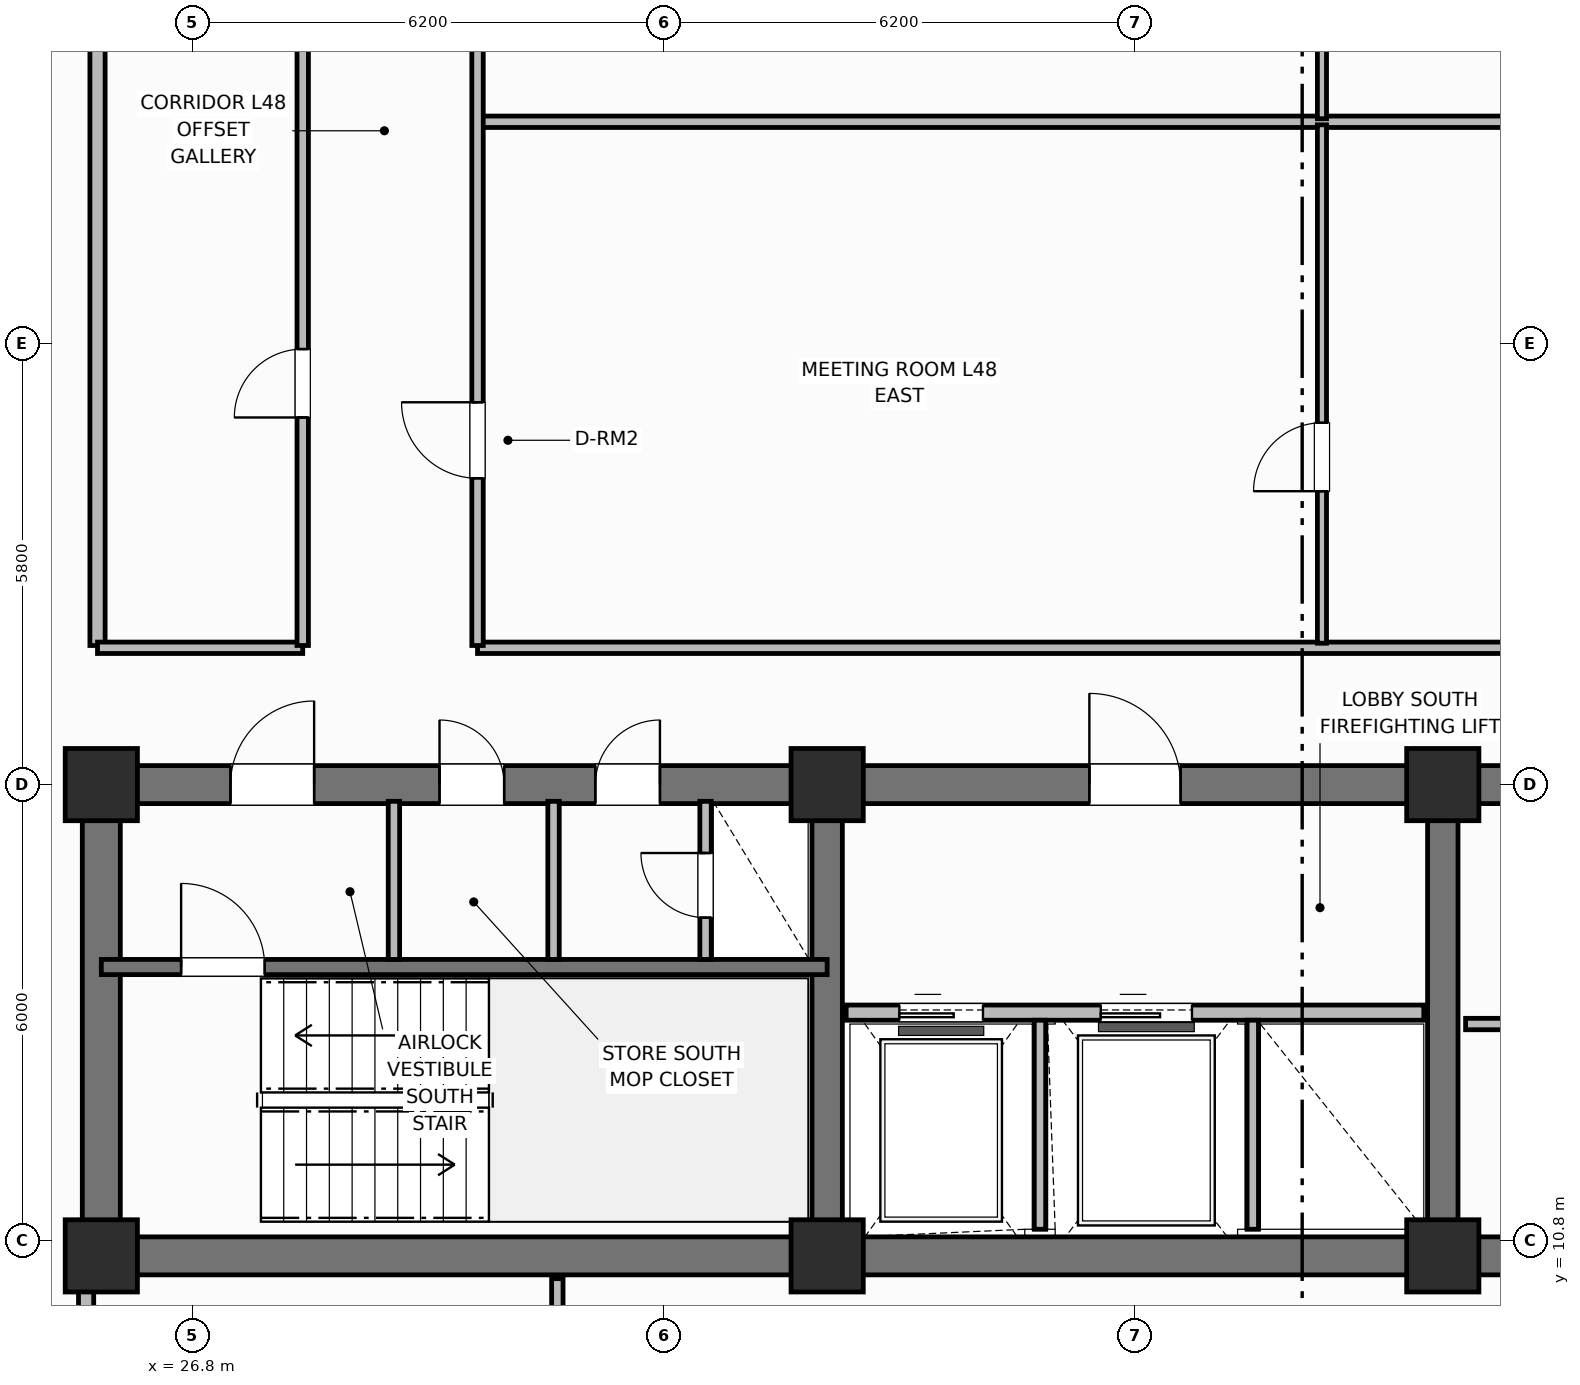
"""IFC4 building model, lengths in metres.
Left out: names, types, materials, properties, quantities, classifications, styles, units other than length and angle.
Written with IfcOpenShell. Run it as: python <this file> out.ifc"""

import sys

from ifc_helpers import new_model, si_unit, direction, frame, frame_2d, origin, origin_2d, place, context, subcontext, project, spatial, rectangle, extrude, element, fill, save


model = new_model("IFC4")
c1 = context("Model", 3, precision=1e-05, world=origin(), true_north=direction((0.0, 1.0)))
c2 = subcontext(c1, "Body", "Model", "MODEL_VIEW")
j1 = project(units=[si_unit("LENGTHUNIT", "METRE"), si_unit("PLANEANGLEUNIT", "RADIAN")], contexts=[c1])
p1 = place(None, origin())
s1 = spatial("IfcSite", under=j1, at=p1, CompositionType="ELEMENT")
p2 = place(p1, origin())
s2 = spatial("IfcBuilding", under=s1, at=p2, CompositionType="ELEMENT")
p3 = place(p2, frame((0.0, 0.0, 192.2)))
s3 = spatial("IfcBuildingStorey", under=s2, at=p3, CompositionType="ELEMENT", Elevation=192.2)
p4 = place(p3, frame((52.8, 10.6, 0.0), z_axis=(0.0, 0.0, 1.0), x_axis=(-1.0, 0.0, 0.0)))
e1 = element("IfcWall", 1, at=p4, inside=s3, PredefinedType="SHEAR", context=c2, shape_type="SweptSolid", body=[
    extrude(rectangle(XDim=27.2, YDim=0.5, at=frame_2d((13.6, 0.0))), origin(), (0.0, 0.0, 1.0), 3.7),
])
p5 = place(p3, frame((25.6, 10.85, 0.0), z_axis=(0.0, 0.0, 1.0), x_axis=(0.0, 1.0, 0.0)))
e2 = element("IfcWall", 2, at=p5, inside=s3, PredefinedType="SHEAR", context=c2, shape_type="SweptSolid", body=[
    extrude(rectangle(XDim=5.7, YDim=0.5, at=frame_2d((2.85, 0.0))), origin(), (0.0, 0.0, 1.0), 3.7),
])
p6 = place(p3, frame((25.6, 16.8, 0.0), z_axis=(0.0, 0.0, 1.0), x_axis=(1.0, 0.0, 0.0)))
e3 = element("IfcWall", 3, at=p6, inside=s3, PredefinedType="SHEAR", context=c2, shape_type="SweptSolid", body=[
    extrude(rectangle(XDim=27.2, YDim=0.5, at=frame_2d((13.6, 0.0))), origin(), (0.0, 0.0, 1.0), 3.7),
])
p7 = place(p6, frame((1.7, 0.0, 0.0)))
e4 = element("IfcOpeningElement", 4, at=p7, cuts=e3, PredefinedType="OPENING", context=c2, shape_type="SweptSolid", body=[
    extrude(rectangle(XDim=1.1, YDim=2.15, at=frame_2d((0.55, 1.075))), frame((0.0, 0.26, 0.0), z_axis=(0.0, -1.0, 0.0), x_axis=(1.0, 0.0, 0.0)), (0.0, 0.0, 1.0), 0.52),
])
p8 = place(p6, frame((4.45, 0.0, 0.0)))
e5 = element("IfcOpeningElement", 5, at=p8, cuts=e3, PredefinedType="OPENING", context=c2, shape_type="SweptSolid", body=[
    extrude(rectangle(XDim=0.85, YDim=2.1, at=frame_2d((0.425, 1.05))), frame((0.0, 0.26, 0.0), z_axis=(0.0, -1.0, 0.0), x_axis=(1.0, 0.0, 0.0)), (0.0, 0.0, 1.0), 0.52),
])
p9 = place(p6, frame((6.5, 0.0, 0.0)))
e6 = element("IfcOpeningElement", 6, at=p9, cuts=e3, PredefinedType="OPENING", context=c2, shape_type="SweptSolid", body=[
    extrude(rectangle(XDim=0.85, YDim=2.1, at=frame_2d((0.425, 1.05))), frame((0.0, 0.26, 0.0), z_axis=(0.0, -1.0, 0.0), x_axis=(1.0, 0.0, 0.0)), (0.0, 0.0, 1.0), 0.52),
])
p10 = place(p6, frame((13.0, 0.0, 0.0)))
e7 = element("IfcOpeningElement", 7, at=p10, cuts=e3, PredefinedType="OPENING", context=c2, shape_type="SweptSolid", body=[
    extrude(rectangle(XDim=1.2, YDim=2.15, at=frame_2d((0.6, 1.075))), frame((0.0, 0.26, 0.0), z_axis=(0.0, -1.0, 0.0), x_axis=(1.0, 0.0, 0.0)), (0.0, 0.0, 1.0), 0.52),
])
p11 = place(p6, frame((19.8, 0.0, 0.0)))
e8 = element("IfcOpeningElement", 8, at=p11, cuts=e3, PredefinedType="OPENING", context=c2, shape_type="SweptSolid", body=[
    extrude(rectangle(XDim=0.85, YDim=2.1, at=frame_2d((0.425, 1.05))), frame((0.0, 0.26, 0.0), z_axis=(0.0, -1.0, 0.0), x_axis=(1.0, 0.0, 0.0)), (0.0, 0.0, 1.0), 0.52),
])
p12 = place(p6, frame((24.2, 0.0, 0.0)))
e9 = element("IfcOpeningElement", 9, at=p12, cuts=e3, PredefinedType="OPENING", context=c2, shape_type="SweptSolid", body=[
    extrude(rectangle(XDim=0.85, YDim=2.1, at=frame_2d((0.425, 1.05))), frame((0.0, 0.26, 0.0), z_axis=(0.0, -1.0, 0.0), x_axis=(1.0, 0.0, 0.0)), (0.0, 0.0, 1.0), 0.52),
])
for number, where, z_axis, x_axis in (
    (10, (35.15, 10.85, 0.0), (0.0, 0.0, 1.0), (0.0, 1.0, 0.0)),
    (11, (43.25, 10.85, 0.0), (0.0, 0.0, 1.0), (0.0, 1.0, 0.0)),
):
    element("IfcWall", number, at=place(p3, frame(where, z_axis=z_axis, x_axis=x_axis)), inside=s3, PredefinedType="SHEAR", context=c2, shape_type="SweptSolid", body=[
        extrude(rectangle(XDim=5.7, YDim=0.4, at=frame_2d((2.85, 0.0))), origin(), (0.0, 0.0, 1.0), 3.7),
    ])
for number, where, z_axis, x_axis in (
    (12, (25.6, 10.6, 0.0), (0.0, 0.0, 1.0), (1.0, 0.0, 0.0)),
    (13, (25.6, 16.8, 0.0), (0.0, 0.0, 1.0), (1.0, 0.0, 0.0)),
    (14, (35.15, 10.6, 0.0), (0.0, 0.0, 1.0), (1.0, 0.0, 0.0)),
    (15, (35.15, 16.8, 0.0), (0.0, 0.0, 1.0), (1.0, 0.0, 0.0)),
    (16, (43.25, 10.6, 0.0), (0.0, 0.0, 1.0), (1.0, 0.0, 0.0)),
    (17, (43.25, 16.8, 0.0), (0.0, 0.0, 1.0), (1.0, 0.0, 0.0)),
):
    element("IfcColumn", number, at=place(p3, frame(where, z_axis=z_axis, x_axis=x_axis)), inside=s3, PredefinedType="COLUMN", context=c2, shape_type="SweptSolid", body=[
        extrude(rectangle(XDim=0.95, YDim=0.95, at=origin_2d()), origin(), (0.0, 0.0, 1.0), 3.7),
    ])
p13 = place(p3, frame((25.6, 14.4, 0.0), z_axis=(0.0, 0.0, 1.0), x_axis=(1.0, 0.0, 0.0)))
e18 = element("IfcWall", 18, at=p13, inside=s3, PredefinedType="SHEAR", context=c2, shape_type="SweptSolid", body=[
    extrude(rectangle(XDim=9.55, YDim=0.2, at=frame_2d((4.775, 0.0))), origin(), (0.0, 0.0, 1.0), 3.7),
])
p14 = place(p13, frame((1.05, 0.0, 0.0)))
e19 = element("IfcOpeningElement", 19, at=p14, cuts=e18, PredefinedType="OPENING", context=c2, shape_type="SweptSolid", body=[
    extrude(rectangle(XDim=1.1, YDim=2.15, at=frame_2d((0.55, 1.075))), frame((0.0, 0.11, 0.0), z_axis=(0.0, -1.0, 0.0), x_axis=(1.0, 0.0, 0.0)), (0.0, 0.0, 1.0), 0.22),
])
for number, where, z_axis, x_axis in (
    (20, (29.45, 14.5, 0.0), (0.0, 0.0, 1.0), (0.0, 1.0, 0.0)),
    (21, (31.55, 14.5, 0.0), (0.0, 0.0, 1.0), (0.0, 1.0, 0.0)),
):
    element("IfcWall", number, at=place(p3, frame(where, z_axis=z_axis, x_axis=x_axis)), inside=s3, PredefinedType="PARTITIONING", context=c2, shape_type="SweptSolid", body=[
        extrude(rectangle(XDim=2.08, YDim=0.15, at=frame_2d((1.04, 0.0))), origin(), (0.0, 0.0, 1.0), 2.49),
    ])
p15 = place(p3, frame((33.55, 14.5, 0.0), z_axis=(0.0, 0.0, 1.0), x_axis=(0.0, 1.0, 0.0)))
e22 = element("IfcWall", 22, at=p15, inside=s3, PredefinedType="PARTITIONING", context=c2, shape_type="SweptSolid", body=[
    extrude(rectangle(XDim=2.08, YDim=0.15, at=frame_2d((1.04, 0.0))), origin(), (0.0, 0.0, 1.0), 2.49),
])
p16 = place(p15, frame((0.55, 0.0, 0.0)))
e23 = element("IfcOpeningElement", 23, at=p16, cuts=e22, PredefinedType="OPENING", context=c2, shape_type="SweptSolid", body=[
    extrude(rectangle(XDim=0.85, YDim=2.05, at=frame_2d((0.425, 1.025))), frame((0.0, 0.085, 0.0), z_axis=(0.0, -1.0, 0.0), x_axis=(1.0, 0.0, 0.0)), (0.0, 0.0, 1.0), 0.17),
])
p17 = place(p3, frame((35.4, 13.8, 0.0), z_axis=(0.0, 0.0, 1.0), x_axis=(1.0, 0.0, 0.0)))
e24 = element("IfcWall", 24, at=p17, inside=s3, PredefinedType="PARTITIONING", context=c2, shape_type="SweptSolid", body=[
    extrude(rectangle(XDim=7.6, YDim=0.2, at=frame_2d((3.8, 0.0))), origin(), (0.0, 0.0, 1.0), 2.26),
])
p18 = place(p17, frame((0.7, 0.0, 0.0)))
e25 = element("IfcOpeningElement", 25, at=p18, cuts=e24, PredefinedType="OPENING", context=c2, shape_type="SweptSolid", body=[
    extrude(rectangle(XDim=1.1, YDim=2.15, at=frame_2d((0.55, 1.075))), frame((0.0, 0.11, 0.0), z_axis=(0.0, -1.0, 0.0), x_axis=(1.0, 0.0, 0.0)), (0.0, 0.0, 1.0), 0.22),
])
p19 = place(p17, frame((3.35, 0.0, 0.0)))
e26 = element("IfcOpeningElement", 26, at=p19, cuts=e24, PredefinedType="OPENING", context=c2, shape_type="SweptSolid", body=[
    extrude(rectangle(XDim=1.2, YDim=2.15, at=frame_2d((0.6, 1.075))), frame((0.0, 0.11, 0.0), z_axis=(0.0, -1.0, 0.0), x_axis=(1.0, 0.0, 0.0)), (0.0, 0.0, 1.0), 0.22),
])
for number, where, z_axis, x_axis in (
    (27, (37.95, 10.95, 0.0), (0.0, 0.0, 1.0), (0.0, 1.0, 0.0)),
    (28, (40.75, 10.95, 0.0), (0.0, 0.0, 1.0), (0.0, 1.0, 0.0)),
):
    element("IfcWall", number, at=place(p3, frame(where, z_axis=z_axis, x_axis=x_axis)), inside=s3, PredefinedType="PARTITIONING", context=c2, shape_type="SweptSolid", body=[
        extrude(rectangle(XDim=2.75, YDim=0.15, at=frame_2d((1.375, 0.0))), origin(), (0.0, 0.0, 1.0), 2.49),
    ])
p20 = place(p3, frame((43.55, 13.65, 0.0), z_axis=(0.0, 0.0, 1.0), x_axis=(1.0, 0.0, 0.0)))
e29 = element("IfcWall", 29, at=p20, inside=s3, PredefinedType="PARTITIONING", context=c2, shape_type="SweptSolid", body=[
    extrude(rectangle(XDim=4.4, YDim=0.15, at=frame_2d((2.2, 0.0))), origin(), (0.0, 0.0, 1.0), 2.49),
])
p21 = place(p20, frame((1.6, 0.0, 0.0)))
e30 = element("IfcOpeningElement", 30, at=p21, cuts=e29, PredefinedType="OPENING", context=c2, shape_type="SweptSolid", body=[
    extrude(rectangle(XDim=0.85, YDim=2.1, at=frame_2d((0.425, 1.05))), frame((0.0, 0.085, 0.0), z_axis=(0.0, -1.0, 0.0), x_axis=(1.0, 0.0, 0.0)), (0.0, 0.0, 1.0), 0.17),
])
p22 = place(p3, frame((25.55, 18.63, 0.0), z_axis=(0.0, 0.0, 1.0), x_axis=(0.0, 1.0, 0.0)))
e31 = element("IfcWall", 31, at=p22, inside=s3, PredefinedType="PARTITIONING", context=c2, shape_type="SweptSolid", body=[
    extrude(rectangle(XDim=19.14, YDim=0.2, at=frame_2d((9.57, 0.0))), origin(), (0.0, 0.0, 1.0), 2.49),
])
p23 = place(p3, frame((25.55, 18.6, 0.0), z_axis=(0.0, 0.0, 1.0), x_axis=(1.0, 0.0, 0.0)))
e32 = element("IfcWall", 32, at=p23, inside=s3, PredefinedType="PARTITIONING", context=c2, shape_type="SweptSolid", body=[
    extrude(rectangle(XDim=2.7, YDim=0.15, at=frame_2d((1.35, 0.0))), origin(), (0.0, 0.0, 1.0), 2.49),
])
p24 = place(p3, frame((30.55, 18.6, 0.0), z_axis=(0.0, 0.0, 1.0), x_axis=(1.0, 0.0, 0.0)))
e33 = element("IfcWall", 33, at=p24, inside=s3, PredefinedType="PARTITIONING", context=c2, shape_type="SweptSolid", body=[
    extrude(rectangle(XDim=22.3, YDim=0.15, at=frame_2d((11.15, 0.0))), origin(), (0.0, 0.0, 1.0), 2.49),
])
p25 = place(p3, frame((30.58, 25.521, 0.0), z_axis=(0.0, 0.0, 1.0), x_axis=(1.0, 0.0, 0.0)))
e34 = element("IfcWall", 34, at=p25, inside=s3, PredefinedType="PARTITIONING", context=c2, shape_type="SweptSolid", body=[
    extrude(rectangle(XDim=22.22, YDim=0.15, at=frame_2d((11.11, 0.0))), origin(), (0.0, 0.0, 1.0), 2.49),
])
p26 = place(p3, frame((41.66, 18.66, 0.0), z_axis=(0.0, 0.0, 1.0), x_axis=(0.0, 1.0, 0.0)))
e35 = element("IfcWall", 35, at=p26, inside=s3, PredefinedType="PARTITIONING", context=c2, shape_type="SweptSolid", body=[
    extrude(rectangle(XDim=6.821, YDim=0.12, at=frame_2d((3.41, 0.0))), origin(), (0.0, 0.0, 1.0), 2.49),
])
p27 = place(p26, frame((2.0, 0.0, 0.0)))
e36 = element("IfcOpeningElement", 36, at=p27, cuts=e35, PredefinedType="OPENING", context=c2, shape_type="SweptSolid", body=[
    extrude(rectangle(XDim=0.9, YDim=2.1, at=frame_2d((0.45, 1.05))), frame((0.0, 0.07, 0.0), z_axis=(0.0, -1.0, 0.0), x_axis=(1.0, 0.0, 0.0)), (0.0, 0.0, 1.0), 0.14),
])
p28 = place(p3, frame((41.66, 25.56, 0.0), z_axis=(0.0, 0.0, 1.0), x_axis=(0.0, 1.0, 0.0)))
e37 = element("IfcWall", 37, at=p28, inside=s3, PredefinedType="PARTITIONING", context=c2, shape_type="SweptSolid", body=[
    extrude(rectangle(XDim=12.18, YDim=0.12, at=frame_2d((6.09, 0.0))), origin(), (0.0, 0.0, 1.0), 2.49),
])
p29 = place(p28, frame((2.0, 0.0, 0.0)))
e38 = element("IfcOpeningElement", 38, at=p29, cuts=e37, PredefinedType="OPENING", context=c2, shape_type="SweptSolid", body=[
    extrude(rectangle(XDim=0.9, YDim=2.1, at=frame_2d((0.45, 1.05))), frame((0.0, 0.07, 0.0), z_axis=(0.0, -1.0, 0.0), x_axis=(1.0, 0.0, 0.0)), (0.0, 0.0, 1.0), 0.14),
])
p30 = place(p3, frame((28.25, 18.63, 0.0), z_axis=(0.0, 0.0, 1.0), x_axis=(0.0, 1.0, 0.0)))
e39 = element("IfcWall", 39, at=p30, inside=s3, PredefinedType="PARTITIONING", context=c2, shape_type="SweptSolid", body=[
    extrude(rectangle(XDim=19.14, YDim=0.15, at=frame_2d((9.57, 0.0))), origin(), (0.0, 0.0, 1.0), 2.49),
])
p31 = place(p30, frame((3.0, 0.0, 0.0)))
e40 = element("IfcOpeningElement", 40, at=p31, cuts=e39, PredefinedType="OPENING", context=c2, shape_type="SweptSolid", body=[
    extrude(rectangle(XDim=0.9, YDim=2.1, at=frame_2d((0.45, 1.05))), frame((0.0, 0.085, 0.0), z_axis=(0.0, -1.0, 0.0), x_axis=(1.0, 0.0, 0.0)), (0.0, 0.0, 1.0), 0.17),
])
p32 = place(p30, frame((11.5, 0.0, 0.0)))
e41 = element("IfcOpeningElement", 41, at=p32, cuts=e39, PredefinedType="OPENING", context=c2, shape_type="SweptSolid", body=[
    extrude(rectangle(XDim=0.9, YDim=2.1, at=frame_2d((0.45, 1.05))), frame((0.0, 0.085, 0.0), z_axis=(0.0, -1.0, 0.0), x_axis=(1.0, 0.0, 0.0)), (0.0, 0.0, 1.0), 0.17),
])
p33 = place(p3, frame((30.55, 18.63, 0.0), z_axis=(0.0, 0.0, 1.0), x_axis=(0.0, 1.0, 0.0)))
e42 = element("IfcWall", 42, at=p33, inside=s3, PredefinedType="PARTITIONING", context=c2, shape_type="SweptSolid", body=[
    extrude(rectangle(XDim=19.14, YDim=0.15, at=frame_2d((9.57, 0.0))), origin(), (0.0, 0.0, 1.0), 2.49),
])
p34 = place(p33, frame((2.2, 0.0, 0.0)))
e43 = element("IfcOpeningElement", 43, at=p34, cuts=e42, PredefinedType="OPENING", context=c2, shape_type="SweptSolid", body=[
    extrude(rectangle(XDim=1.0, YDim=2.15, at=frame_2d((0.5, 1.075))), frame((0.0, 0.085, 0.0), z_axis=(0.0, -1.0, 0.0), x_axis=(1.0, 0.0, 0.0)), (0.0, 0.0, 1.0), 0.17),
])
p35 = place(p33, frame((8.89, 0.0, 0.0)))
e44 = element("IfcOpeningElement", 44, at=p35, cuts=e42, PredefinedType="OPENING", context=c2, shape_type="SweptSolid", body=[
    extrude(rectangle(XDim=1.0, YDim=2.15, at=frame_2d((0.5, 1.075))), frame((0.0, 0.085, 0.0), z_axis=(0.0, -1.0, 0.0), x_axis=(1.0, 0.0, 0.0)), (0.0, 0.0, 1.0), 0.17),
])
p36 = place(p3, frame((31.6, 6.87, 0.0), z_axis=(0.0, 0.0, 1.0), x_axis=(0.0, 1.0, 0.0)))
e45 = element("IfcWall", 45, at=p36, inside=s3, PredefinedType="PARTITIONING", context=c2, shape_type="SweptSolid", body=[
    extrude(rectangle(XDim=3.43, YDim=0.15, at=frame_2d((1.715, 0.0))), origin(), (0.0, 0.0, 1.0), 2.49),
])
p37 = place(p36, frame((1.75, 0.0, 0.0)))
e46 = element("IfcOpeningElement", 46, at=p37, cuts=e45, PredefinedType="OPENING", context=c2, shape_type="SweptSolid", body=[
    extrude(rectangle(XDim=0.9, YDim=2.1, at=frame_2d((0.45, 1.05))), frame((0.0, 0.085, 0.0), z_axis=(0.0, -1.0, 0.0), x_axis=(1.0, 0.0, 0.0)), (0.0, 0.0, 1.0), 0.17),
])
p38 = place(p3, frame((25.4, 7.97, 0.0), z_axis=(0.0, 0.0, 1.0), x_axis=(0.0, 1.0, 0.0)))
e47 = element("IfcWall", 47, at=p38, inside=s3, PredefinedType="PARTITIONING", context=c2, shape_type="SweptSolid", body=[
    extrude(rectangle(XDim=2.33, YDim=0.2, at=frame_2d((1.165, 0.0))), origin(), (0.0, 0.0, 1.0), 2.49),
])
p39 = place(p38, frame((0.65, 0.0, 0.0)))
e48 = element("IfcOpeningElement", 48, at=p39, cuts=e47, PredefinedType="OPENING", context=c2, shape_type="SweptSolid", body=[
    extrude(rectangle(XDim=0.9, YDim=2.1, at=frame_2d((0.45, 1.05))), frame((0.0, 0.11, 0.0), z_axis=(0.0, -1.0, 0.0), x_axis=(1.0, 0.0, 0.0)), (0.0, 0.0, 1.0), 0.22),
])
p40 = place(p14, origin())
e49 = element("IfcDoor", 49, at=p40, inside=s3, OperationType="SINGLE_SWING_LEFT", PredefinedType="DOOR", context=c2, shape_type="SweptSolid", body=[
    extrude(rectangle(XDim=1.1, YDim=2.15, at=frame_2d((0.55, 1.075))), frame((0.0, 0.025, 0.0), z_axis=(0.0, -1.0, 0.0), x_axis=(1.0, 0.0, 0.0)), (0.0, 0.0, 1.0), 0.05),
])
fill(e19, e49)
p41 = place(p16, origin())
e50 = element("IfcDoor", 50, at=p41, inside=s3, OperationType="SINGLE_SWING_RIGHT", PredefinedType="TRAPDOOR", context=c2, shape_type="SweptSolid", body=[
    extrude(rectangle(XDim=0.85, YDim=2.05, at=frame_2d((0.425, 1.025))), frame((0.0, 0.025, 0.0), z_axis=(0.0, -1.0, 0.0), x_axis=(1.0, 0.0, 0.0)), (0.0, 0.0, 1.0), 0.05),
])
fill(e23, e50)
p42 = place(p18, origin())
e51 = element("IfcDoor", 51, at=p42, inside=s3, OperationType="SLIDING_TO_LEFT", PredefinedType="DOOR", context=c2, shape_type="SweptSolid", body=[
    extrude(rectangle(XDim=1.1, YDim=2.15, at=frame_2d((0.55, 1.075))), frame((0.0, 0.025, 0.0), z_axis=(0.0, -1.0, 0.0), x_axis=(1.0, 0.0, 0.0)), (0.0, 0.0, 1.0), 0.05),
])
fill(e25, e51)
p43 = place(p19, origin())
e52 = element("IfcDoor", 52, at=p43, inside=s3, OperationType="SLIDING_TO_LEFT", PredefinedType="DOOR", context=c2, shape_type="SweptSolid", body=[
    extrude(rectangle(XDim=1.2, YDim=2.15, at=frame_2d((0.6, 1.075))), frame((0.0, 0.025, 0.0), z_axis=(0.0, -1.0, 0.0), x_axis=(1.0, 0.0, 0.0)), (0.0, 0.0, 1.0), 0.05),
])
fill(e26, e52)
p44 = place(p27, origin())
e53 = element("IfcDoor", 53, at=p44, inside=s3, OperationType="SINGLE_SWING_LEFT", PredefinedType="DOOR", context=c2, shape_type="SweptSolid", body=[
    extrude(rectangle(XDim=0.9, YDim=2.1, at=frame_2d((0.45, 1.05))), frame((0.0, 0.025, 0.0), z_axis=(0.0, -1.0, 0.0), x_axis=(1.0, 0.0, 0.0)), (0.0, 0.0, 1.0), 0.05),
])
fill(e36, e53)
p45 = place(p31, origin())
e54 = element("IfcDoor", 54, at=p45, inside=s3, OperationType="SINGLE_SWING_LEFT", PredefinedType="DOOR", context=c2, shape_type="SweptSolid", body=[
    extrude(rectangle(XDim=0.9, YDim=2.1, at=frame_2d((0.45, 1.05))), frame((0.0, 0.025, 0.0), z_axis=(0.0, -1.0, 0.0), x_axis=(1.0, 0.0, 0.0)), (0.0, 0.0, 1.0), 0.05),
])
fill(e40, e54)
p46 = place(p34, origin())
e55 = element("IfcDoor", 55, at=p46, inside=s3, OperationType="SINGLE_SWING_RIGHT", PredefinedType="DOOR", context=c2, shape_type="SweptSolid", body=[
    extrude(rectangle(XDim=1.0, YDim=2.15, at=frame_2d((0.5, 1.075))), frame((0.0, 0.025, 0.0), z_axis=(0.0, -1.0, 0.0), x_axis=(1.0, 0.0, 0.0)), (0.0, 0.0, 1.0), 0.05),
])
fill(e43, e55)
p47 = place(p7, origin())
e56 = element("IfcDoor", 56, at=p47, inside=s3, OperationType="SINGLE_SWING_RIGHT", PredefinedType="DOOR", context=c2, shape_type="SweptSolid", body=[
    extrude(rectangle(XDim=1.1, YDim=2.15, at=frame_2d((0.55, 1.075))), frame((0.0, 0.025, 0.0), z_axis=(0.0, -1.0, 0.0), x_axis=(1.0, 0.0, 0.0)), (0.0, 0.0, 1.0), 0.05),
])
fill(e4, e56)
p48 = place(p8, origin())
e57 = element("IfcDoor", 57, at=p48, inside=s3, OperationType="SINGLE_SWING_LEFT", PredefinedType="DOOR", context=c2, shape_type="SweptSolid", body=[
    extrude(rectangle(XDim=0.85, YDim=2.1, at=frame_2d((0.425, 1.05))), frame((0.0, 0.025, 0.0), z_axis=(0.0, -1.0, 0.0), x_axis=(1.0, 0.0, 0.0)), (0.0, 0.0, 1.0), 0.05),
])
fill(e5, e57)
p49 = place(p9, origin())
e58 = element("IfcDoor", 58, at=p49, inside=s3, OperationType="SINGLE_SWING_RIGHT", PredefinedType="DOOR", context=c2, shape_type="SweptSolid", body=[
    extrude(rectangle(XDim=0.85, YDim=2.1, at=frame_2d((0.425, 1.05))), frame((0.0, 0.025, 0.0), z_axis=(0.0, -1.0, 0.0), x_axis=(1.0, 0.0, 0.0)), (0.0, 0.0, 1.0), 0.05),
])
fill(e6, e58)
p50 = place(p10, origin())
e59 = element("IfcDoor", 59, at=p50, inside=s3, OperationType="SINGLE_SWING_LEFT", PredefinedType="DOOR", context=c2, shape_type="SweptSolid", body=[
    extrude(rectangle(XDim=1.2, YDim=2.15, at=frame_2d((0.6, 1.075))), frame((0.0, 0.025, 0.0), z_axis=(0.0, -1.0, 0.0), x_axis=(1.0, 0.0, 0.0)), (0.0, 0.0, 1.0), 0.05),
])
fill(e7, e59)
save(model, sys.argv[1])
